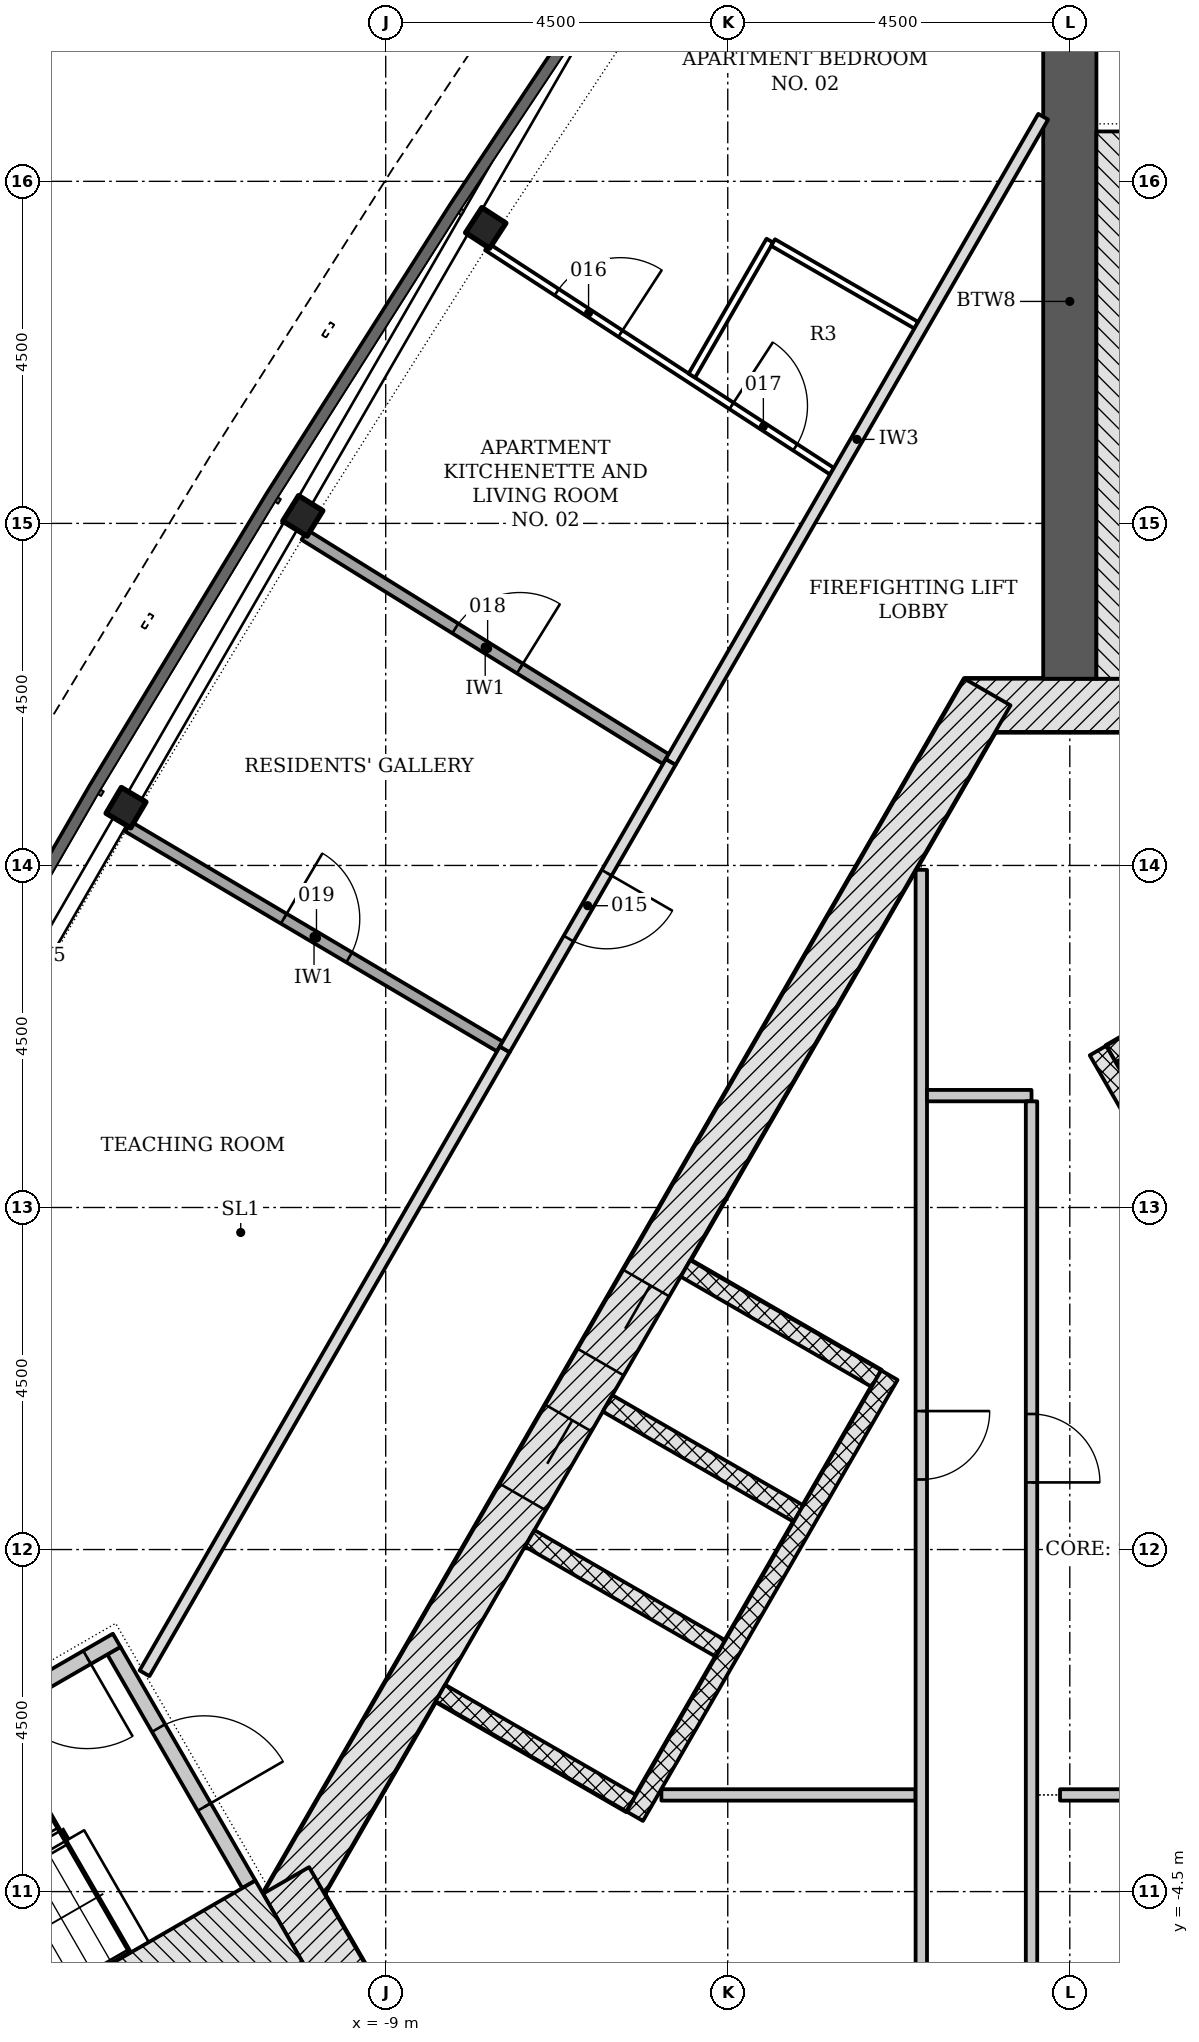
"""IFC4 building model, lengths in metres.
Left out: names, types, materials, properties, quantities, classifications, styles, units other than length and angle.
Written with IfcOpenShell. Run it as: python <this file> out.ifc"""

import sys

from ifc_helpers import new_model, si_unit, direction, frame, frame_2d, origin, origin_2d, place, context, subcontext, project, spatial, rectangle, i_section, extrude, element, fill, save


model = new_model("IFC4")
c1 = context("Model", 3, precision=1e-05, world=origin(), true_north=direction((0.0, 1.0)))
c2 = subcontext(c1, "Body", "Model", "MODEL_VIEW")
j1 = project(units=[si_unit("LENGTHUNIT", "METRE"), si_unit("PLANEANGLEUNIT", "RADIAN")], contexts=[c1])
p1 = place(None, origin())
s1 = spatial("IfcSite", under=j1, at=p1, CompositionType="ELEMENT")
p2 = place(p1, origin())
s2 = spatial("IfcBuilding", under=s1, at=p2, CompositionType="ELEMENT")
p3 = place(p2, frame((0.0, 0.0, 174.3)))
s3 = spatial("IfcBuildingStorey", under=s2, at=p3, CompositionType="ELEMENT", Elevation=174.3)
p4 = place(p3, frame((1.386, 11.106, -0.2), z_axis=(0.0, 0.0, 1.0), x_axis=(-1.0, 0.0, 0.0)))
e1 = element("IfcWall", 1, at=p4, inside=s3, PredefinedType="SHEAR", context=c2, shape_type="SweptSolid", body=[
    extrude(rectangle(XDim=2.771, YDim=0.7, at=frame_2d((1.386, 0.0))), origin(), (0.0, 0.0, 1.0), 3.6),
])
p5 = place(p3, frame((-1.083, 11.281, -0.2), z_axis=(0.0, 0.0, 1.0), x_axis=(-0.500001446645, -0.866024568562, 0.0)))
e2 = element("IfcWall", 2, at=p5, inside=s3, PredefinedType="SHEAR", context=c2, shape_type="SweptSolid", body=[
    extrude(rectangle(XDim=18.458, YDim=0.7, at=frame_2d((9.229, 0.0))), origin(), (0.0, 0.0, 1.0), 3.6),
])
p6 = place(p5, frame((8.979, 0.0, 0.2)))
e3 = element("IfcOpeningElement", 3, at=p6, cuts=e2, PredefinedType="OPENING", context=c2, shape_type="SweptSolid", body=[
    extrude(rectangle(XDim=1.2, YDim=2.1, at=frame_2d((0.6, 1.05))), frame((0.0, 0.36, 0.0), z_axis=(0.0, -1.0, 0.0), x_axis=(1.0, 0.0, 0.0)), (0.0, 0.0, 1.0), 0.72),
])
p7 = place(p5, frame((11.029, 0.0, 0.2)))
e4 = element("IfcOpeningElement", 4, at=p7, cuts=e2, PredefinedType="OPENING", context=c2, shape_type="SweptSolid", body=[
    extrude(rectangle(XDim=1.2, YDim=2.1, at=frame_2d((0.6, 1.05))), frame((0.0, 0.36, 0.0), z_axis=(0.0, -1.0, 0.0), x_axis=(1.0, 0.0, 0.0)), (0.0, 0.0, 1.0), 0.72),
])
p8 = place(p3, frame((-10.311, -4.353, -0.2), z_axis=(0.0, 0.0, 1.0), x_axis=(0.500042739161, -0.866000726912, 0.0)))
e5 = element("IfcWall", 5, at=p8, inside=s3, PredefinedType="SHEAR", context=c2, shape_type="SweptSolid", body=[
    extrude(rectangle(XDim=2.771, YDim=0.7, at=frame_2d((1.386, 0.0))), origin(), (0.0, 0.0, 1.0), 3.6),
])
p9 = place(p3, frame((0.0, 11.456, -0.2), z_axis=(0.0, 0.0, 1.0), x_axis=(0.0, 1.0, 0.0)))
e6 = element("IfcWall", 6, at=p9, inside=s3, PredefinedType="SHEAR", context=c2, shape_type="SweptSolid", body=[
    extrude(rectangle(XDim=9.928, YDim=0.7, at=frame_2d((4.964, 0.0))), origin(), (0.0, 0.0, 1.0), 3.6),
])
p10 = place(p3, frame((-9.922, -5.728, -0.2), z_axis=(0.0, 0.0, 1.0), x_axis=(-0.866029553954, -0.499992811627, 0.0)))
e7 = element("IfcWall", 7, at=p10, inside=s3, PredefinedType="SHEAR", context=c2, shape_type="SweptSolid", body=[
    extrude(rectangle(XDim=9.927, YDim=0.7, at=frame_2d((4.964, 0.0))), origin(), (0.0, 0.0, 1.0), 3.6),
])
for number, where, z_axis, x_axis in (
    (8, (-7.684, 17.387, -0.2), (0.0, 0.0, 1.0), (-0.545, -0.838, 0.0)),
    (9, (-10.091, 13.599, -0.2), (0.0, 0.0, 1.0), (-0.527, -0.85, 0.0)),
    (10, (-12.417, 9.76, -0.2), (0.0, 0.0, 1.0), (-0.509, -0.861, 0.0)),
):
    element("IfcColumn", number, at=place(p3, frame(where, z_axis=z_axis, x_axis=x_axis)), inside=s3, PredefinedType="COLUMN", context=c2, shape_type="SweptSolid", body=[
        extrude(i_section(OverallWidth=0.394, OverallDepth=0.376, WebThickness=0.017, FlangeThickness=0.028, FilletRadius=0.015, at=origin_2d()), origin(), (0.0, 0.0, 1.0), 3.6),
    ])
p11 = place(p3, frame((2.706, 7.769, -0.2), z_axis=(0.0, 0.0, 1.0), x_axis=(-0.866022959057, -0.500004234368, 0.0)))
e11 = element("IfcWall", 11, at=p11, inside=s3, PredefinedType="PARTITIONING", context=c2, shape_type="SweptSolid", body=[
    extrude(rectangle(XDim=2.5, YDim=0.25, at=frame_2d((1.25, 0.0))), origin(), (0.0, 0.0, 1.0), 3.6),
])
p12 = place(p3, frame((5.87, -2.961, 0.0), z_axis=(0.0, 0.0, 1.0), x_axis=(-0.50000615651, 0.866021849293, 0.0)))
e12 = element("IfcWall", 12, at=p12, inside=s3, PredefinedType="PARTITIONING", context=c2, shape_type="SweptSolid", body=[
    extrude(rectangle(XDim=11.0, YDim=0.25, at=frame_2d((5.5, 0.0))), origin(), (0.0, 0.0, 1.0), 3.4),
])
for number, where, z_axis, x_axis in (
    (13, (-5.056, 3.699, -0.2), (0.0, 0.0, 1.0), (0.866, -0.5, 0.0)),
    (14, (-6.081, 1.923, -0.2), (0.0, 0.0, 1.0), (0.866, -0.5, 0.0)),
    (15, (-7.106, 0.148, -0.2), (0.0, 0.0, 1.0), (0.866, -0.5, 0.0)),
    (16, (-8.281, -1.887, -0.2), (0.0, 0.0, 1.0), (0.866, -0.5, 0.0)),
):
    element("IfcWall", number, at=place(p3, frame(where, z_axis=z_axis, x_axis=x_axis)), inside=s3, PredefinedType="PARTITIONING", context=c2, shape_type="SweptSolid", body=[
        extrude(rectangle(XDim=2.9, YDim=0.25, at=frame_2d((1.45, 0.0))), origin(), (0.0, 0.0, 1.0), 3.6),
    ])
p13 = place(p3, frame((-2.374, 2.294, 0.0), z_axis=(0.0, 0.0, 1.0), x_axis=(-0.500003174267, -0.866023571113, 0.0)))
e17 = element("IfcWall", 17, at=p13, inside=s3, PredefinedType="PARTITIONING", context=c2, shape_type="SweptSolid", body=[
    extrude(rectangle(XDim=6.7, YDim=0.25, at=frame_2d((3.35, 0.0))), origin(), (0.0, 0.0, 1.0), 3.4),
])
p14 = place(p3, frame((-5.373, -3.228, 0.0), z_axis=(0.0, 0.0, 1.0), x_axis=(1.0, 0.0, 0.0)))
e18 = element("IfcWall", 18, at=p14, inside=s3, PredefinedType="PARTITIONING", context=c2, shape_type="SweptSolid", body=[
    extrude(rectangle(XDim=3.344, YDim=0.15, at=frame_2d((1.672, 0.0))), origin(), (0.0, 0.0, 1.0), 3.4),
])
p15 = place(p3, frame((-1.954, 8.942, 0.0), z_axis=(0.0, 0.0, 1.0), x_axis=(0.0, -1.0, 0.0)))
e19 = element("IfcWall", 19, at=p15, inside=s3, PredefinedType="PARTITIONING", context=c2, shape_type="SweptSolid", body=[
    extrude(rectangle(XDim=15.171, YDim=0.15, at=frame_2d((7.585, 0.0))), origin(), (0.0, 0.0, 1.0), 3.4),
])
p16 = place(p15, frame((7.121, 0.0, 0.0)))
e20 = element("IfcOpeningElement", 20, at=p16, cuts=e19, PredefinedType="OPENING", context=c2, shape_type="SweptSolid", body=[
    extrude(rectangle(XDim=0.9, YDim=2.1, at=frame_2d((0.45, 1.05))), frame((0.0, 0.085, 0.0), z_axis=(0.0, -1.0, 0.0), x_axis=(1.0, 0.0, 0.0)), (0.0, 0.0, 1.0), 0.17),
])
p17 = place(p3, frame((-1.879, 5.972, 0.0), z_axis=(0.0, 0.0, 1.0), x_axis=(1.0, 0.0, 0.0)))
e21 = element("IfcWall", 21, at=p17, inside=s3, PredefinedType="PARTITIONING", context=c2, shape_type="SweptSolid", body=[
    extrude(rectangle(XDim=1.375, YDim=0.15, at=frame_2d((0.688, 0.0))), origin(), (0.0, 0.0, 1.0), 3.4),
])
p18 = place(p3, frame((-0.504, 5.897, 0.0), z_axis=(0.0, 0.0, 1.0), x_axis=(0.0, -1.0, 0.0)))
e22 = element("IfcWall", 22, at=p18, inside=s3, PredefinedType="PARTITIONING", context=c2, shape_type="SweptSolid", body=[
    extrude(rectangle(XDim=12.125, YDim=0.15, at=frame_2d((6.062, 0.0))), origin(), (0.0, 0.0, 1.0), 3.4),
])
p19 = place(p18, frame((4.114, 0.0, 0.0)))
e23 = element("IfcOpeningElement", 23, at=p19, cuts=e22, PredefinedType="OPENING", context=c2, shape_type="SweptSolid", body=[
    extrude(rectangle(XDim=0.9, YDim=2.1, at=frame_2d((0.45, 1.05))), frame((0.0, 0.085, 0.0), z_axis=(0.0, -1.0, 0.0), x_axis=(1.0, 0.0, 0.0)), (0.0, 0.0, 1.0), 0.17),
])
p20 = place(p3, frame((-0.129, -3.228, 0.0), z_axis=(0.0, 0.0, 1.0), x_axis=(1.0, 0.0, 0.0)))
e24 = element("IfcWall", 24, at=p20, inside=s3, PredefinedType="PARTITIONING", context=c2, shape_type="SweptSolid", body=[
    extrude(rectangle(XDim=9.139, YDim=0.15, at=frame_2d((4.57, 0.0))), origin(), (0.0, 0.0, 1.0), 3.4),
])
p21 = place(p3, frame((0.968, 11.456, -0.2), z_axis=(0.0, 0.0, 1.0), x_axis=(0.0, 1.0, 0.0)))
e25 = element("IfcWall", 25, at=p21, inside=s3, PredefinedType="SHEAR", context=c2, shape_type="SweptSolid", body=[
    extrude(rectangle(XDim=7.2, YDim=1.236, at=frame_2d((3.6, 0.0))), origin(), (0.0, 0.0, 1.0), 3.6),
])
p22 = place(p3, frame((-12.576, -1.331, -0.2), z_axis=(0.0, 0.0, 1.0), x_axis=(0.499970499736, -0.8660424351, 0.0)))
e26 = element("IfcWall", 26, at=p22, inside=s3, PredefinedType="SHEAR", context=c2, shape_type="SweptSolid", body=[
    extrude(rectangle(XDim=3.55, YDim=0.2, at=frame_2d((1.775, 0.0))), origin(), (0.0, 0.0, 1.0), 3.6),
])
p23 = place(p22, frame((1.175, 0.0, 0.2)))
e27 = element("IfcOpeningElement", 27, at=p23, cuts=e26, PredefinedType="OPENING", context=c2, shape_type="SweptSolid", body=[
    extrude(rectangle(XDim=1.2, YDim=2.1, at=frame_2d((0.6, 1.05))), frame((0.0, 0.11, 0.0), z_axis=(0.0, -1.0, 0.0), x_axis=(1.0, 0.0, 0.0)), (0.0, 0.0, 1.0), 0.22),
])
p24 = place(p3, frame((-12.539, -1.194, -0.2), z_axis=(0.0, 0.0, 1.0), x_axis=(-0.866045472092, -0.499965239061, 0.0)))
e28 = element("IfcWall", 28, at=p24, inside=s3, PredefinedType="SHEAR", context=c2, shape_type="SweptSolid", body=[
    extrude(rectangle(XDim=5.6, YDim=0.2, at=frame_2d((2.8, 0.0))), origin(), (0.0, 0.0, 1.0), 3.6),
])
p25 = place(p24, frame((0.45, 0.0, 0.2)))
e29 = element("IfcOpeningElement", 29, at=p25, cuts=e28, PredefinedType="OPENING", context=c2, shape_type="SweptSolid", body=[
    extrude(rectangle(XDim=1.2, YDim=2.1, at=frame_2d((0.6, 1.05))), frame((0.0, 0.11, 0.0), z_axis=(0.0, -1.0, 0.0), x_axis=(1.0, 0.0, 0.0)), (0.0, 0.0, 1.0), 0.22),
])
p26 = place(p3, frame((-10.406, -4.89, -0.2), z_axis=(0.0, 0.0, 1.0), x_axis=(-0.866018442252, -0.500012057535, 0.0)))
e30 = element("IfcWall", 30, at=p26, inside=s3, PredefinedType="SHEAR", context=c2, shape_type="SweptSolid", body=[
    extrude(rectangle(XDim=7.2, YDim=1.236, at=frame_2d((3.6, 0.0))), origin(), (0.0, 0.0, 1.0), 3.6),
])
p27 = place(p3, frame((-0.35, 18.85, 0.0), z_axis=(0.0, 0.0, 1.0), x_axis=(-0.499985463203, -0.866033796445, 0.0)))
e31 = element("IfcWall", 31, at=p27, inside=s3, PredefinedType="PARTITIONING", context=c2, shape_type="SweptSolid", body=[
    extrude(rectangle(XDim=9.803, YDim=0.15, at=frame_2d((4.901, 0.0))), origin(), (0.0, 0.0, 1.0), 2.847),
])
p28 = place(p3, frame((-7.434, 6.58, 0.0), z_axis=(0.0, 0.0, 1.0), x_axis=(-0.499998195608, -0.866026445548, 0.0)))
e32 = element("IfcWall", 32, at=p28, inside=s3, PredefinedType="PARTITIONING", context=c2, shape_type="SweptSolid", body=[
    extrude(rectangle(XDim=9.478, YDim=0.15, at=frame_2d((4.739, 0.0))), origin(), (0.0, 0.0, 1.0), 2.847),
])
p29 = place(p3, frame((-10.067, 13.348, 0.0), z_axis=(0.0, 0.0, 1.0), x_axis=(0.84969615017, -0.527272654692, 0.0)))
e33 = element("IfcWall", 33, at=p29, inside=s3, PredefinedType="PARTITIONING", context=c2, shape_type="SweptSolid", body=[
    extrude(rectangle(XDim=5.592, YDim=0.15, at=frame_2d((2.796, 0.0))), origin(), (0.0, 0.0, 1.0), 3.4),
])
p30 = place(p29, frame((2.333, 0.0, 0.0)))
e34 = element("IfcOpeningElement", 34, at=p30, cuts=e33, PredefinedType="OPENING", context=c2, shape_type="SweptSolid", body=[
    extrude(rectangle(XDim=1.0, YDim=2.1, at=frame_2d((0.5, 1.05))), frame((0.0, 0.085, 0.0), z_axis=(0.0, -1.0, 0.0), x_axis=(1.0, 0.0, 0.0)), (0.0, 0.0, 1.0), 0.17),
])
p31 = place(p3, frame((-12.388, 9.51, 0.0), z_axis=(0.0, 0.0, 1.0), x_axis=(0.860691995407, -0.509126005073, 0.0)))
e35 = element("IfcWall", 35, at=p31, inside=s3, PredefinedType="PARTITIONING", context=c2, shape_type="SweptSolid", body=[
    extrude(rectangle(XDim=5.68, YDim=0.15, at=frame_2d((2.84, 0.0))), origin(), (0.0, 0.0, 1.0), 3.4),
])
p32 = place(p31, frame((2.378, 0.0, 0.0)))
e36 = element("IfcOpeningElement", 36, at=p32, cuts=e35, PredefinedType="OPENING", context=c2, shape_type="SweptSolid", body=[
    extrude(rectangle(XDim=1.0, YDim=2.1, at=frame_2d((0.5, 1.05))), frame((0.0, 0.085, 0.0), z_axis=(0.0, -1.0, 0.0), x_axis=(1.0, 0.0, 0.0)), (0.0, 0.0, 1.0), 0.17),
])
p33 = place(p3, frame((-5.251, 10.36, 0.0), z_axis=(0.0, 0.0, 1.0), x_axis=(-0.500012937857, -0.86601793398, 0.0)))
e37 = element("IfcWall", 37, at=p33, inside=s3, PredefinedType="PARTITIONING", context=c2, shape_type="SweptSolid", body=[
    extrude(rectangle(XDim=4.365, YDim=0.15, at=frame_2d((2.183, 0.0))), origin(), (0.0, 0.0, 1.0), 2.847),
])
p34 = place(p33, frame((1.683, 0.0, 0.0)))
e38 = element("IfcOpeningElement", 38, at=p34, cuts=e37, PredefinedType="OPENING", context=c2, shape_type="SweptSolid", body=[
    extrude(rectangle(XDim=1.0, YDim=2.1, at=frame_2d((0.5, 1.05))), frame((0.0, 0.085, 0.0), z_axis=(0.0, -1.0, 0.0), x_axis=(1.0, 0.0, 0.0)), (0.0, 0.0, 1.0), 0.17),
])
p35 = place(p3, frame((-7.666, 17.136, 0.0), z_axis=(0.0, 0.0, 1.0), x_axis=(0.838353922252, -0.545126316595, 0.0)))
e39 = element("IfcWall", 39, at=p35, inside=s3, PredefinedType="PARTITIONING", context=c2, shape_type="SweptSolid", body=[
    extrude(rectangle(XDim=5.411, YDim=0.1, at=frame_2d((2.706, 0.0))), origin(), (0.0, 0.0, 1.0), 3.4),
])
p36 = place(p35, frame((1.092, 0.0, 0.0)))
e40 = element("IfcOpeningElement", 40, at=p36, cuts=e39, PredefinedType="OPENING", context=c2, shape_type="SweptSolid", body=[
    extrude(rectangle(XDim=1.0, YDim=2.1, at=frame_2d((0.5, 1.05))), frame((0.0, 0.06, 0.0), z_axis=(0.0, -1.0, 0.0), x_axis=(1.0, 0.0, 0.0)), (0.0, 0.0, 1.0), 0.12),
])
p37 = place(p35, frame((3.835, 0.0, 0.0)))
e41 = element("IfcOpeningElement", 41, at=p37, cuts=e39, PredefinedType="OPENING", context=c2, shape_type="SweptSolid", body=[
    extrude(rectangle(XDim=1.0, YDim=2.1, at=frame_2d((0.5, 1.05))), frame((0.0, 0.06, 0.0), z_axis=(0.0, -1.0, 0.0), x_axis=(1.0, 0.0, 0.0)), (0.0, 0.0, 1.0), 0.12),
])
p38 = place(p3, frame((-4.972, 15.445, 0.0), z_axis=(0.0, 0.0, 1.0), x_axis=(0.499956128963, 0.866050731258, 0.0)))
e42 = element("IfcWall", 42, at=p38, inside=s3, PredefinedType="PARTITIONING", context=c2, shape_type="SweptSolid", body=[
    extrude(rectangle(XDim=2.05, YDim=0.1, at=frame_2d((1.025, 0.0))), origin(), (0.0, 0.0, 1.0), 2.847),
])
p39 = place(p3, frame((-3.904, 17.195, 0.0), z_axis=(0.0, 0.0, 1.0), x_axis=(0.866065968399, -0.499929733443, 0.0)))
e43 = element("IfcWall", 43, at=p39, inside=s3, PredefinedType="PARTITIONING", context=c2, shape_type="SweptSolid", body=[
    extrude(rectangle(XDim=2.175, YDim=0.1, at=frame_2d((1.087, 0.0))), origin(), (0.0, 0.0, 1.0), 3.4),
])
p40 = place(p6, origin())
e44 = element("IfcDoor", 44, at=p40, inside=s3, OperationType="DOUBLE_DOOR_SLIDING", PredefinedType="DOOR", context=c2, shape_type="SweptSolid", body=[
    extrude(rectangle(XDim=1.2, YDim=2.1, at=frame_2d((0.6, 1.05))), frame((0.0, 0.025, 0.0), z_axis=(0.0, -1.0, 0.0), x_axis=(1.0, 0.0, 0.0)), (0.0, 0.0, 1.0), 0.05),
])
fill(e3, e44)
p41 = place(p7, origin())
e45 = element("IfcDoor", 45, at=p41, inside=s3, OperationType="DOUBLE_DOOR_SLIDING", PredefinedType="DOOR", context=c2, shape_type="SweptSolid", body=[
    extrude(rectangle(XDim=1.2, YDim=2.1, at=frame_2d((0.6, 1.05))), frame((0.0, 0.025, 0.0), z_axis=(0.0, -1.0, 0.0), x_axis=(1.0, 0.0, 0.0)), (0.0, 0.0, 1.0), 0.05),
])
fill(e4, e45)
p42 = place(p16, origin())
e46 = element("IfcDoor", 46, at=p42, inside=s3, OperationType="SINGLE_SWING_LEFT", PredefinedType="DOOR", context=c2, shape_type="SweptSolid", body=[
    extrude(rectangle(XDim=0.9, YDim=2.1, at=frame_2d((0.45, 1.05))), frame((0.0, 0.025, 0.0), z_axis=(0.0, -1.0, 0.0), x_axis=(1.0, 0.0, 0.0)), (0.0, 0.0, 1.0), 0.05),
])
fill(e20, e46)
p43 = place(p19, origin())
e47 = element("IfcDoor", 47, at=p43, inside=s3, OperationType="SINGLE_SWING_RIGHT", PredefinedType="DOOR", context=c2, shape_type="SweptSolid", body=[
    extrude(rectangle(XDim=0.9, YDim=2.1, at=frame_2d((0.45, 1.05))), frame((0.0, 0.025, 0.0), z_axis=(0.0, -1.0, 0.0), x_axis=(1.0, 0.0, 0.0)), (0.0, 0.0, 1.0), 0.05),
])
fill(e23, e47)
p44 = place(p23, origin())
e48 = element("IfcDoor", 48, at=p44, inside=s3, OperationType="SINGLE_SWING_RIGHT", PredefinedType="DOOR", context=c2, shape_type="SweptSolid", body=[
    extrude(rectangle(XDim=1.2, YDim=2.1, at=frame_2d((0.6, 1.05))), frame((0.0, 0.025, 0.0), z_axis=(0.0, -1.0, 0.0), x_axis=(1.0, 0.0, 0.0)), (0.0, 0.0, 1.0), 0.05),
])
fill(e27, e48)
p45 = place(p25, origin())
e49 = element("IfcDoor", 49, at=p45, inside=s3, OperationType="SINGLE_SWING_LEFT", PredefinedType="DOOR", context=c2, shape_type="SweptSolid", body=[
    extrude(rectangle(XDim=1.2, YDim=2.1, at=frame_2d((0.6, 1.05))), frame((0.0, 0.025, 0.0), z_axis=(0.0, -1.0, 0.0), x_axis=(1.0, 0.0, 0.0)), (0.0, 0.0, 1.0), 0.05),
])
fill(e29, e49)
p46 = place(p34, origin())
e50 = element("IfcDoor", 50, at=p46, inside=s3, OperationType="SINGLE_SWING_LEFT", PredefinedType="DOOR", context=c2, shape_type="SweptSolid", body=[
    extrude(rectangle(XDim=1.0, YDim=2.1, at=frame_2d((0.5, 1.05))), frame((0.0, 0.025, 0.0), z_axis=(0.0, -1.0, 0.0), x_axis=(1.0, 0.0, 0.0)), (0.0, 0.0, 1.0), 0.05),
])
fill(e38, e50)
p47 = place(p36, origin())
e51 = element("IfcDoor", 51, at=p47, inside=s3, OperationType="SINGLE_SWING_RIGHT", PredefinedType="DOOR", context=c2, shape_type="SweptSolid", body=[
    extrude(rectangle(XDim=1.0, YDim=2.1, at=frame_2d((0.5, 1.05))), frame((0.0, 0.025, 0.0), z_axis=(0.0, -1.0, 0.0), x_axis=(1.0, 0.0, 0.0)), (0.0, 0.0, 1.0), 0.05),
])
fill(e40, e51)
p48 = place(p37, origin())
e52 = element("IfcDoor", 52, at=p48, inside=s3, OperationType="SINGLE_SWING_LEFT", PredefinedType="DOOR", context=c2, shape_type="SweptSolid", body=[
    extrude(rectangle(XDim=1.0, YDim=2.1, at=frame_2d((0.5, 1.05))), frame((0.0, 0.025, 0.0), z_axis=(0.0, -1.0, 0.0), x_axis=(1.0, 0.0, 0.0)), (0.0, 0.0, 1.0), 0.05),
])
fill(e41, e52)
p49 = place(p30, origin())
e53 = element("IfcDoor", 53, at=p49, inside=s3, OperationType="SINGLE_SWING_RIGHT", PredefinedType="DOOR", context=c2, shape_type="SweptSolid", body=[
    extrude(rectangle(XDim=1.0, YDim=2.1, at=frame_2d((0.5, 1.05))), frame((0.0, 0.025, 0.0), z_axis=(0.0, -1.0, 0.0), x_axis=(1.0, 0.0, 0.0)), (0.0, 0.0, 1.0), 0.05),
])
fill(e34, e53)
p50 = place(p32, origin())
e54 = element("IfcDoor", 54, at=p50, inside=s3, OperationType="SINGLE_SWING_LEFT", PredefinedType="DOOR", context=c2, shape_type="SweptSolid", body=[
    extrude(rectangle(XDim=1.0, YDim=2.1, at=frame_2d((0.5, 1.05))), frame((0.0, 0.025, 0.0), z_axis=(0.0, -1.0, 0.0), x_axis=(1.0, 0.0, 0.0)), (0.0, 0.0, 1.0), 0.05),
])
fill(e36, e54)
save(model, sys.argv[1])
